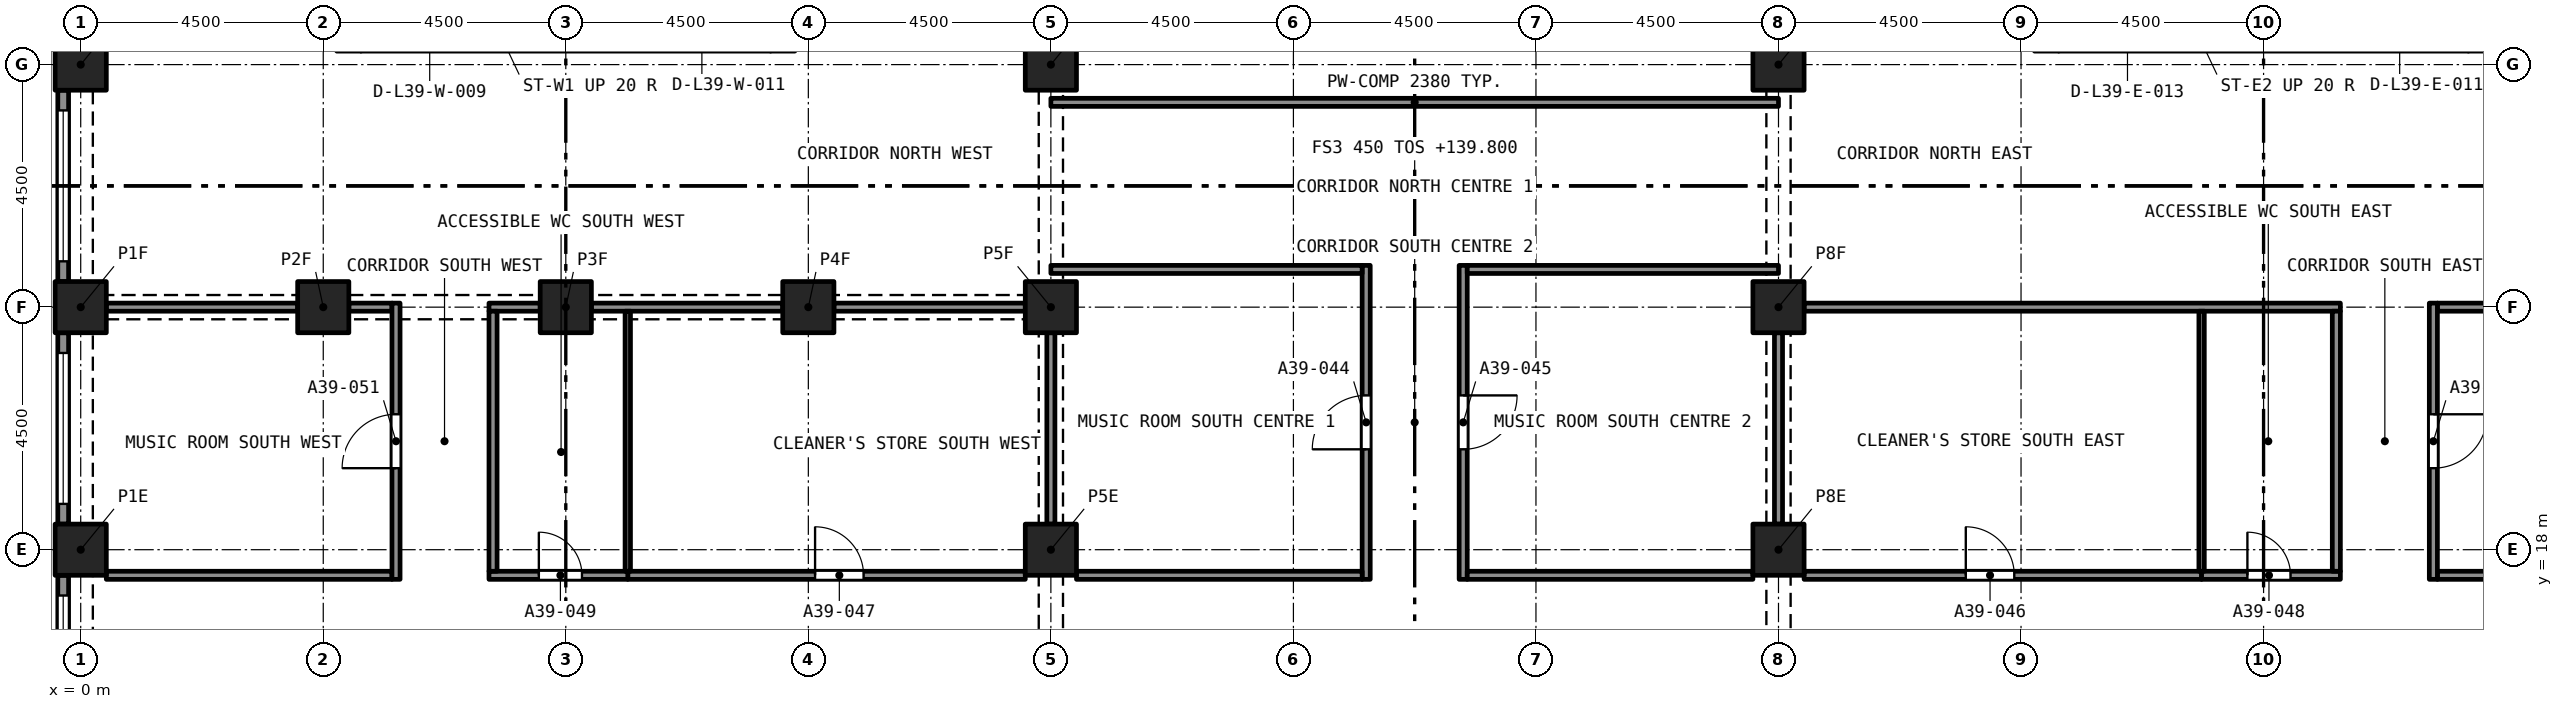
"""IFC4 building model, lengths in metres.
Left out: names, types, materials, properties, quantities, classifications, styles, units other than length and angle.
Written with IfcOpenShell. Run it as: python <this file> out.ifc"""

import sys

from ifc_helpers import new_model, si_unit, direction, frame, frame_2d, origin, origin_2d, place, context, subcontext, project, spatial, rectangle, extrude, element, fill, save


model = new_model("IFC4")
c1 = context("Model", 3, precision=1e-05, world=origin(), true_north=direction((0.0, 1.0)))
c2 = subcontext(c1, "Body", "Model", "MODEL_VIEW")
j1 = project(units=[si_unit("LENGTHUNIT", "METRE"), si_unit("PLANEANGLEUNIT", "RADIAN")], contexts=[c1])
p1 = place(None, origin())
s1 = spatial("IfcSite", under=j1, at=p1, CompositionType="ELEMENT")
p2 = place(p1, origin())
s2 = spatial("IfcBuilding", under=s1, at=p2, CompositionType="ELEMENT")
p3 = place(p2, frame((0.0, 0.0, 139.8)))
s3 = spatial("IfcBuildingStorey", under=s2, at=p3, CompositionType="ELEMENT", Elevation=139.8)
for number, where, z_axis, x_axis in (
    (1, (0.0, 18.0, 0.0), (0.0, 0.0, 1.0), (1.0, 0.0, 0.0)),
    (2, (18.0, 18.0, 0.0), (0.0, 0.0, 1.0), (1.0, 0.0, 0.0)),
    (3, (31.5, 18.0, 0.0), (0.0, 0.0, 1.0), (1.0, 0.0, 0.0)),
    (4, (0.0, 22.5, 0.0), (0.0, 0.0, 1.0), (1.0, 0.0, 0.0)),
    (5, (4.5, 22.5, 0.0), (0.0, 0.0, 1.0), (1.0, 0.0, 0.0)),
    (6, (9.0, 22.5, 0.0), (0.0, 0.0, 1.0), (1.0, 0.0, 0.0)),
    (7, (13.5, 22.5, 0.0), (0.0, 0.0, 1.0), (1.0, 0.0, 0.0)),
    (8, (18.0, 22.5, 0.0), (0.0, 0.0, 1.0), (1.0, 0.0, 0.0)),
    (9, (31.5, 22.5, 0.0), (0.0, 0.0, 1.0), (1.0, 0.0, 0.0)),
    (10, (0.0, 27.0, 0.0), (0.0, 0.0, 1.0), (1.0, 0.0, 0.0)),
    (11, (18.0, 27.0, 0.0), (0.0, 0.0, 1.0), (1.0, 0.0, 0.0)),
    (12, (31.5, 27.0, 0.0), (0.0, 0.0, 1.0), (1.0, 0.0, 0.0)),
):
    element("IfcColumn", number, at=place(p3, frame(where, z_axis=z_axis, x_axis=x_axis)), inside=s3, PredefinedType="COLUMN", context=c2, shape_type="SweptSolid", body=[
        extrude(rectangle(XDim=0.95, YDim=0.95, at=origin_2d()), origin(), (0.0, 0.0, 1.0), 3.2),
    ])
p4 = place(p3, frame((-0.325, 22.975, 0.0), z_axis=(0.0, 0.0, 1.0), x_axis=(0.0, 1.0, 0.0)))
e13 = element("IfcWall", 13, at=p4, inside=s3, PredefinedType="SOLIDWALL", context=c2, shape_type="SweptSolid", body=[
    extrude(rectangle(XDim=3.55, YDim=0.2, at=frame_2d((1.775, 0.0))), origin(), (0.0, 0.0, 1.0), 3.2),
])
p5 = place(p4, frame((0.375, 0.0, 0.45)))
e14 = element("IfcOpeningElement", 14, at=p5, cuts=e13, PredefinedType="OPENING", context=c2, shape_type="SweptSolid", body=[
    extrude(rectangle(XDim=2.8, YDim=1.95, at=frame_2d((1.4, 0.975))), frame((0.0, 0.11, 0.0), z_axis=(0.0, -1.0, 0.0), x_axis=(1.0, 0.0, 0.0)), (0.0, 0.0, 1.0), 0.22),
])
p6 = place(p3, frame((-0.325, 18.475, 0.0), z_axis=(0.0, 0.0, 1.0), x_axis=(0.0, 1.0, 0.0)))
e15 = element("IfcWall", 15, at=p6, inside=s3, PredefinedType="SOLIDWALL", context=c2, shape_type="SweptSolid", body=[
    extrude(rectangle(XDim=3.55, YDim=0.2, at=frame_2d((1.775, 0.0))), origin(), (0.0, 0.0, 1.0), 3.2),
])
p7 = place(p6, frame((0.375, 0.0, 0.45)))
e16 = element("IfcOpeningElement", 16, at=p7, cuts=e15, PredefinedType="OPENING", context=c2, shape_type="SweptSolid", body=[
    extrude(rectangle(XDim=2.8, YDim=1.95, at=frame_2d((1.4, 0.975))), frame((0.0, 0.11, 0.0), z_axis=(0.0, -1.0, 0.0), x_axis=(1.0, 0.0, 0.0)), (0.0, 0.0, 1.0), 0.22),
])
p8 = place(p3, frame((-0.325, 13.975, 0.0), z_axis=(0.0, 0.0, 1.0), x_axis=(0.0, 1.0, 0.0)))
e17 = element("IfcWall", 17, at=p8, inside=s3, PredefinedType="SOLIDWALL", context=c2, shape_type="SweptSolid", body=[
    extrude(rectangle(XDim=3.55, YDim=0.2, at=frame_2d((1.775, 0.0))), origin(), (0.0, 0.0, 1.0), 3.2),
])
p9 = place(p8, frame((0.375, 0.0, 0.45)))
e18 = element("IfcOpeningElement", 18, at=p9, cuts=e17, PredefinedType="OPENING", context=c2, shape_type="SweptSolid", body=[
    extrude(rectangle(XDim=2.8, YDim=1.95, at=frame_2d((1.4, 0.975))), frame((0.0, 0.11, 0.0), z_axis=(0.0, -1.0, 0.0), x_axis=(1.0, 0.0, 0.0)), (0.0, 0.0, 1.0), 0.22),
])
p10 = place(p3, frame((23.85, 17.45, 0.0), z_axis=(0.0, 0.0, 1.0), x_axis=(0.0, 1.0, 0.0)))
e19 = element("IfcWall", 19, at=p10, inside=s3, PredefinedType="PARTITIONING", context=c2, shape_type="SweptSolid", body=[
    extrude(rectangle(XDim=5.825, YDim=0.15, at=frame_2d((2.913, 0.0))), origin(), (0.0, 0.0, 1.0), 2.75),
])
p11 = place(p10, frame((2.413, 0.0, 0.0)))
e20 = element("IfcOpeningElement", 20, at=p11, cuts=e19, PredefinedType="OPENING", context=c2, shape_type="SweptSolid", body=[
    extrude(rectangle(XDim=1.0, YDim=2.1, at=frame_2d((0.5, 1.05))), frame((0.0, 0.085, 0.0), z_axis=(0.0, -1.0, 0.0), x_axis=(1.0, 0.0, 0.0)), (0.0, 0.0, 1.0), 0.17),
])
p12 = place(p3, frame((25.65, 23.275, 0.0), z_axis=(0.0, 0.0, 1.0), x_axis=(0.0, -1.0, 0.0)))
e21 = element("IfcWall", 21, at=p12, inside=s3, PredefinedType="PARTITIONING", context=c2, shape_type="SweptSolid", body=[
    extrude(rectangle(XDim=5.825, YDim=0.15, at=frame_2d((2.913, 0.0))), origin(), (0.0, 0.0, 1.0), 2.75),
])
p13 = place(p12, frame((2.413, 0.0, 0.0)))
e22 = element("IfcOpeningElement", 22, at=p13, cuts=e21, PredefinedType="OPENING", context=c2, shape_type="SweptSolid", body=[
    extrude(rectangle(XDim=1.0, YDim=2.1, at=frame_2d((0.5, 1.05))), frame((0.0, 0.085, 0.0), z_axis=(0.0, -1.0, 0.0), x_axis=(1.0, 0.0, 0.0)), (0.0, 0.0, 1.0), 0.17),
])
for number, where, z_axis, x_axis in (
    (23, (18.475, 17.525, 0.0), (0.0, 0.0, 1.0), (1.0, 0.0, 0.0)),
    (24, (25.725, 17.525, 0.0), (0.0, 0.0, 1.0), (1.0, 0.0, 0.0)),
):
    element("IfcWall", number, at=place(p3, frame(where, z_axis=z_axis, x_axis=x_axis)), inside=s3, PredefinedType="PARTITIONING", context=c2, shape_type="SweptSolid", body=[
        extrude(rectangle(XDim=5.3, YDim=0.15, at=frame_2d((2.65, 0.0))), origin(), (0.0, 0.0, 1.0), 2.75),
    ])
p14 = place(p3, frame((31.975, 17.525, 0.0), z_axis=(0.0, 0.0, 1.0), x_axis=(1.0, 0.0, 0.0)))
e25 = element("IfcWall", 25, at=p14, inside=s3, PredefinedType="PARTITIONING", context=c2, shape_type="SweptSolid", body=[
    extrude(rectangle(XDim=7.375, YDim=0.15, at=frame_2d((3.688, 0.0))), origin(), (0.0, 0.0, 1.0), 2.9),
])
p15 = place(p14, frame((3.0, 0.0, 0.0)))
e26 = element("IfcOpeningElement", 26, at=p15, cuts=e25, PredefinedType="OPENING", context=c2, shape_type="SweptSolid", body=[
    extrude(rectangle(XDim=0.9, YDim=2.1, at=frame_2d((0.45, 1.05))), frame((0.0, 0.085, 0.0), z_axis=(0.0, -1.0, 0.0), x_axis=(1.0, 0.0, 0.0)), (0.0, 0.0, 1.0), 0.17),
])
p16 = place(p3, frame((10.15, 17.525, 0.0), z_axis=(0.0, 0.0, 1.0), x_axis=(1.0, 0.0, 0.0)))
e27 = element("IfcWall", 27, at=p16, inside=s3, PredefinedType="PARTITIONING", context=c2, shape_type="SweptSolid", body=[
    extrude(rectangle(XDim=7.375, YDim=0.15, at=frame_2d((3.688, 0.0))), origin(), (0.0, 0.0, 1.0), 2.9),
])
p17 = place(p16, frame((3.475, 0.0, 0.0)))
e28 = element("IfcOpeningElement", 28, at=p17, cuts=e27, PredefinedType="OPENING", context=c2, shape_type="SweptSolid", body=[
    extrude(rectangle(XDim=0.9, YDim=2.1, at=frame_2d((0.45, 1.05))), frame((0.0, 0.085, 0.0), z_axis=(0.0, -1.0, 0.0), x_axis=(1.0, 0.0, 0.0)), (0.0, 0.0, 1.0), 0.17),
])
p18 = place(p3, frame((39.35, 17.525, 0.0), z_axis=(0.0, 0.0, 1.0), x_axis=(1.0, 0.0, 0.0)))
e29 = element("IfcWall", 29, at=p18, inside=s3, PredefinedType="PARTITIONING", context=c2, shape_type="SweptSolid", body=[
    extrude(rectangle(XDim=2.575, YDim=0.15, at=frame_2d((1.288, 0.0))), origin(), (0.0, 0.0, 1.0), 2.9),
])
p19 = place(p18, frame((0.85, 0.0, 0.0)))
e30 = element("IfcOpeningElement", 30, at=p19, cuts=e29, PredefinedType="OPENING", context=c2, shape_type="SweptSolid", body=[
    extrude(rectangle(XDim=0.8, YDim=2.1, at=frame_2d((0.4, 1.05))), frame((0.0, 0.085, 0.0), z_axis=(0.0, -1.0, 0.0), x_axis=(1.0, 0.0, 0.0)), (0.0, 0.0, 1.0), 0.17),
])
p20 = place(p3, frame((7.575, 17.525, 0.0), z_axis=(0.0, 0.0, 1.0), x_axis=(1.0, 0.0, 0.0)))
e31 = element("IfcWall", 31, at=p20, inside=s3, PredefinedType="PARTITIONING", context=c2, shape_type="SweptSolid", body=[
    extrude(rectangle(XDim=2.575, YDim=0.15, at=frame_2d((1.288, 0.0))), origin(), (0.0, 0.0, 1.0), 2.9),
])
p21 = place(p20, frame((0.925, 0.0, 0.0)))
e32 = element("IfcOpeningElement", 32, at=p21, cuts=e31, PredefinedType="OPENING", context=c2, shape_type="SweptSolid", body=[
    extrude(rectangle(XDim=0.8, YDim=2.1, at=frame_2d((0.4, 1.05))), frame((0.0, 0.085, 0.0), z_axis=(0.0, -1.0, 0.0), x_axis=(1.0, 0.0, 0.0)), (0.0, 0.0, 1.0), 0.17),
])
for number, where, z_axis, x_axis in (
    (33, (43.725, 17.525, 0.0), (0.0, 0.0, 1.0), (1.0, 0.0, 0.0)),
    (34, (0.475, 17.525, 0.0), (0.0, 0.0, 1.0), (1.0, 0.0, 0.0)),
):
    element("IfcWall", number, at=place(p3, frame(where, z_axis=z_axis, x_axis=x_axis)), inside=s3, PredefinedType="PARTITIONING", context=c2, shape_type="SweptSolid", body=[
        extrude(rectangle(XDim=5.3, YDim=0.15, at=frame_2d((2.65, 0.0))), origin(), (0.0, 0.0, 1.0), 2.9),
    ])
p22 = place(p3, frame((18.0, 26.3, 0.0), z_axis=(0.0, 0.0, 1.0), x_axis=(1.0, 0.0, 0.0)))
e35 = element("IfcWall", 35, at=p22, inside=s3, PredefinedType="PARTITIONING", context=c2, shape_type="SweptSolid", body=[
    extrude(rectangle(XDim=13.5, YDim=0.15, at=frame_2d((6.75, 0.0))), origin(), (0.0, 0.0, 1.0), 2.38),
])
p23 = place(p3, frame((18.0, 23.2, 0.0), z_axis=(0.0, 0.0, 1.0), x_axis=(1.0, 0.0, 0.0)))
e36 = element("IfcWall", 36, at=p23, inside=s3, PredefinedType="PARTITIONING", context=c2, shape_type="SweptSolid", body=[
    extrude(rectangle(XDim=5.775, YDim=0.15, at=frame_2d((2.887, 0.0))), origin(), (0.0, 0.0, 1.0), 2.75),
])
p24 = place(p3, frame((18.0, 18.475, 0.0), z_axis=(0.0, 0.0, 1.0), x_axis=(0.0, 1.0, 0.0)))
e37 = element("IfcWall", 37, at=p24, inside=s3, PredefinedType="PARTITIONING", context=c2, shape_type="SweptSolid", body=[
    extrude(rectangle(XDim=3.55, YDim=0.15, at=frame_2d((1.775, 0.0))), origin(), (0.0, 0.0, 1.0), 2.38),
])
p25 = place(p3, frame((25.725, 23.2, 0.0), z_axis=(0.0, 0.0, 1.0), x_axis=(1.0, 0.0, 0.0)))
e38 = element("IfcWall", 38, at=p25, inside=s3, PredefinedType="PARTITIONING", context=c2, shape_type="SweptSolid", body=[
    extrude(rectangle(XDim=5.775, YDim=0.15, at=frame_2d((2.887, 0.0))), origin(), (0.0, 0.0, 1.0), 2.75),
])
p26 = place(p3, frame((31.5, 18.475, 0.0), z_axis=(0.0, 0.0, 1.0), x_axis=(0.0, 1.0, 0.0)))
e39 = element("IfcWall", 39, at=p26, inside=s3, PredefinedType="PARTITIONING", context=c2, shape_type="SweptSolid", body=[
    extrude(rectangle(XDim=3.55, YDim=0.15, at=frame_2d((1.775, 0.0))), origin(), (0.0, 0.0, 1.0), 2.38),
])
p27 = place(p3, frame((31.975, 22.5, 0.0), z_axis=(0.0, 0.0, 1.0), x_axis=(1.0, 0.0, 0.0)))
e40 = element("IfcWall", 40, at=p27, inside=s3, PredefinedType="PARTITIONING", context=c2, shape_type="SweptSolid", body=[
    extrude(rectangle(XDim=9.95, YDim=0.15, at=frame_2d((4.975, 0.0))), origin(), (0.0, 0.0, 1.0), 2.9),
])
p28 = place(p3, frame((43.725, 22.5, 0.0), z_axis=(0.0, 0.0, 1.0), x_axis=(1.0, 0.0, 0.0)))
e41 = element("IfcWall", 41, at=p28, inside=s3, PredefinedType="PARTITIONING", context=c2, shape_type="SweptSolid", body=[
    extrude(rectangle(XDim=5.3, YDim=0.15, at=frame_2d((2.65, 0.0))), origin(), (0.0, 0.0, 1.0), 2.9),
])
for number, where, z_axis, x_axis in (
    (42, (13.975, 22.5, 0.0), (0.0, 0.0, 1.0), (1.0, 0.0, 0.0)),
    (43, (9.475, 22.5, 0.0), (0.0, 0.0, 1.0), (1.0, 0.0, 0.0)),
):
    element("IfcWall", number, at=place(p3, frame(where, z_axis=z_axis, x_axis=x_axis)), inside=s3, PredefinedType="PARTITIONING", context=c2, shape_type="SweptSolid", body=[
        extrude(rectangle(XDim=3.55, YDim=0.15, at=frame_2d((1.775, 0.0))), origin(), (0.0, 0.0, 1.0), 2.38),
    ])
p29 = place(p3, frame((7.575, 22.5, 0.0), z_axis=(0.0, 0.0, 1.0), x_axis=(1.0, 0.0, 0.0)))
e44 = element("IfcWall", 44, at=p29, inside=s3, PredefinedType="PARTITIONING", context=c2, shape_type="SweptSolid", body=[
    extrude(rectangle(XDim=0.95, YDim=0.15, at=frame_2d((0.475, 0.0))), origin(), (0.0, 0.0, 1.0), 2.38),
])
p30 = place(p3, frame((4.975, 22.5, 0.0), z_axis=(0.0, 0.0, 1.0), x_axis=(1.0, 0.0, 0.0)))
e45 = element("IfcWall", 45, at=p30, inside=s3, PredefinedType="PARTITIONING", context=c2, shape_type="SweptSolid", body=[
    extrude(rectangle(XDim=0.8, YDim=0.15, at=frame_2d((0.4, 0.0))), origin(), (0.0, 0.0, 1.0), 2.38),
])
p31 = place(p3, frame((0.475, 22.5, 0.0), z_axis=(0.0, 0.0, 1.0), x_axis=(1.0, 0.0, 0.0)))
e46 = element("IfcWall", 46, at=p31, inside=s3, PredefinedType="PARTITIONING", context=c2, shape_type="SweptSolid", body=[
    extrude(rectangle(XDim=3.55, YDim=0.15, at=frame_2d((1.775, 0.0))), origin(), (0.0, 0.0, 1.0), 2.38),
])
p32 = place(p3, frame((41.85, 17.6, 0.0), z_axis=(0.0, 0.0, 1.0), x_axis=(0.0, 1.0, 0.0)))
e47 = element("IfcWall", 47, at=p32, inside=s3, PredefinedType="PARTITIONING", context=c2, shape_type="SweptSolid", body=[
    extrude(rectangle(XDim=4.825, YDim=0.15, at=frame_2d((2.413, 0.0))), origin(), (0.0, 0.0, 1.0), 2.9),
])
p33 = place(p3, frame((43.65, 22.575, 0.0), z_axis=(0.0, 0.0, 1.0), x_axis=(0.0, -1.0, 0.0)))
e48 = element("IfcWall", 48, at=p33, inside=s3, PredefinedType="PARTITIONING", context=c2, shape_type="SweptSolid", body=[
    extrude(rectangle(XDim=5.125, YDim=0.15, at=frame_2d((2.562, 0.0))), origin(), (0.0, 0.0, 1.0), 2.9),
])
p34 = place(p33, frame((2.062, 0.0, 0.0)))
e49 = element("IfcOpeningElement", 49, at=p34, cuts=e48, PredefinedType="OPENING", context=c2, shape_type="SweptSolid", body=[
    extrude(rectangle(XDim=1.0, YDim=2.1, at=frame_2d((0.5, 1.05))), frame((0.0, 0.085, 0.0), z_axis=(0.0, -1.0, 0.0), x_axis=(1.0, 0.0, 0.0)), (0.0, 0.0, 1.0), 0.17),
])
p35 = place(p3, frame((7.65, 17.6, 0.0), z_axis=(0.0, 0.0, 1.0), x_axis=(0.0, 1.0, 0.0)))
e50 = element("IfcWall", 50, at=p35, inside=s3, PredefinedType="PARTITIONING", context=c2, shape_type="SweptSolid", body=[
    extrude(rectangle(XDim=4.825, YDim=0.15, at=frame_2d((2.413, 0.0))), origin(), (0.0, 0.0, 1.0), 2.9),
])
p36 = place(p3, frame((5.85, 17.45, 0.0), z_axis=(0.0, 0.0, 1.0), x_axis=(0.0, 1.0, 0.0)))
e51 = element("IfcWall", 51, at=p36, inside=s3, PredefinedType="PARTITIONING", context=c2, shape_type="SweptSolid", body=[
    extrude(rectangle(XDim=5.125, YDim=0.15, at=frame_2d((2.562, 0.0))), origin(), (0.0, 0.0, 1.0), 2.9),
])
p37 = place(p36, frame((2.062, 0.0, 0.0)))
e52 = element("IfcOpeningElement", 52, at=p37, cuts=e51, PredefinedType="OPENING", context=c2, shape_type="SweptSolid", body=[
    extrude(rectangle(XDim=1.0, YDim=2.1, at=frame_2d((0.5, 1.05))), frame((0.0, 0.085, 0.0), z_axis=(0.0, -1.0, 0.0), x_axis=(1.0, 0.0, 0.0)), (0.0, 0.0, 1.0), 0.17),
])
for number, where, z_axis, x_axis in (
    (53, (39.35, 17.6, 0.0), (0.0, 0.0, 1.0), (0.0, 1.0, 0.0)),
    (54, (10.15, 17.6, 0.0), (0.0, 0.0, 1.0), (0.0, 1.0, 0.0)),
):
    element("IfcWall", number, at=place(p3, frame(where, z_axis=z_axis, x_axis=x_axis)), inside=s3, PredefinedType="PARTITIONING", context=c2, shape_type="SweptSolid", body=[
        extrude(rectangle(XDim=4.825, YDim=0.1, at=frame_2d((2.413, 0.0))), origin(), (0.0, 0.0, 1.0), 2.9),
    ])
p38 = place(p5, origin())
e55 = element("IfcWindow", 55, at=p38, inside=s3, PartitioningType="SINGLE_PANEL", PredefinedType="WINDOW", context=c2, shape_type="SweptSolid", body=[
    extrude(rectangle(XDim=2.8, YDim=1.95, at=frame_2d((1.4, 0.975))), frame((0.0, 0.03, 0.0), z_axis=(0.0, -1.0, 0.0), x_axis=(1.0, 0.0, 0.0)), (0.0, 0.0, 1.0), 0.06),
])
fill(e14, e55)
p39 = place(p7, origin())
e56 = element("IfcWindow", 56, at=p39, inside=s3, PartitioningType="SINGLE_PANEL", PredefinedType="WINDOW", context=c2, shape_type="SweptSolid", body=[
    extrude(rectangle(XDim=2.8, YDim=1.95, at=frame_2d((1.4, 0.975))), frame((0.0, 0.03, 0.0), z_axis=(0.0, -1.0, 0.0), x_axis=(1.0, 0.0, 0.0)), (0.0, 0.0, 1.0), 0.06),
])
fill(e16, e56)
p40 = place(p9, origin())
e57 = element("IfcWindow", 57, at=p40, inside=s3, PartitioningType="SINGLE_PANEL", PredefinedType="WINDOW", context=c2, shape_type="SweptSolid", body=[
    extrude(rectangle(XDim=2.8, YDim=1.95, at=frame_2d((1.4, 0.975))), frame((0.0, 0.03, 0.0), z_axis=(0.0, -1.0, 0.0), x_axis=(1.0, 0.0, 0.0)), (0.0, 0.0, 1.0), 0.06),
])
fill(e18, e57)
p41 = place(p11, origin())
e58 = element("IfcDoor", 58, at=p41, inside=s3, OperationType="SINGLE_SWING_LEFT", PredefinedType="DOOR", context=c2, shape_type="SweptSolid", body=[
    extrude(rectangle(XDim=1.0, YDim=2.1, at=frame_2d((0.5, 1.05))), frame((0.0, 0.025, 0.0), z_axis=(0.0, -1.0, 0.0), x_axis=(1.0, 0.0, 0.0)), (0.0, 0.0, 1.0), 0.05),
])
fill(e20, e58)
p42 = place(p13, origin())
e59 = element("IfcDoor", 59, at=p42, inside=s3, OperationType="SINGLE_SWING_RIGHT", PredefinedType="DOOR", context=c2, shape_type="SweptSolid", body=[
    extrude(rectangle(XDim=1.0, YDim=2.1, at=frame_2d((0.5, 1.05))), frame((0.0, 0.025, 0.0), z_axis=(0.0, -1.0, 0.0), x_axis=(1.0, 0.0, 0.0)), (0.0, 0.0, 1.0), 0.05),
])
fill(e22, e59)
p43 = place(p15, origin())
e60 = element("IfcDoor", 60, at=p43, inside=s3, OperationType="SINGLE_SWING_LEFT", PredefinedType="DOOR", context=c2, shape_type="SweptSolid", body=[
    extrude(rectangle(XDim=0.9, YDim=2.1, at=frame_2d((0.45, 1.05))), frame((0.0, 0.025, 0.0), z_axis=(0.0, -1.0, 0.0), x_axis=(1.0, 0.0, 0.0)), (0.0, 0.0, 1.0), 0.05),
])
fill(e26, e60)
p44 = place(p17, origin())
e61 = element("IfcDoor", 61, at=p44, inside=s3, OperationType="SINGLE_SWING_RIGHT", PredefinedType="DOOR", context=c2, shape_type="SweptSolid", body=[
    extrude(rectangle(XDim=0.9, YDim=2.1, at=frame_2d((0.45, 1.05))), frame((0.0, 0.025, 0.0), z_axis=(0.0, -1.0, 0.0), x_axis=(1.0, 0.0, 0.0)), (0.0, 0.0, 1.0), 0.05),
])
fill(e28, e61)
p45 = place(p19, origin())
e62 = element("IfcDoor", 62, at=p45, inside=s3, OperationType="SINGLE_SWING_LEFT", PredefinedType="DOOR", context=c2, shape_type="SweptSolid", body=[
    extrude(rectangle(XDim=0.8, YDim=2.1, at=frame_2d((0.4, 1.05))), frame((0.0, 0.025, 0.0), z_axis=(0.0, -1.0, 0.0), x_axis=(1.0, 0.0, 0.0)), (0.0, 0.0, 1.0), 0.05),
])
fill(e30, e62)
p46 = place(p21, origin())
e63 = element("IfcDoor", 63, at=p46, inside=s3, OperationType="SINGLE_SWING_RIGHT", PredefinedType="DOOR", context=c2, shape_type="SweptSolid", body=[
    extrude(rectangle(XDim=0.8, YDim=2.1, at=frame_2d((0.4, 1.05))), frame((0.0, 0.025, 0.0), z_axis=(0.0, -1.0, 0.0), x_axis=(1.0, 0.0, 0.0)), (0.0, 0.0, 1.0), 0.05),
])
fill(e32, e63)
p47 = place(p34, origin())
e64 = element("IfcDoor", 64, at=p47, inside=s3, OperationType="SINGLE_SWING_RIGHT", PredefinedType="DOOR", context=c2, shape_type="SweptSolid", body=[
    extrude(rectangle(XDim=1.0, YDim=2.1, at=frame_2d((0.5, 1.05))), frame((0.0, 0.025, 0.0), z_axis=(0.0, -1.0, 0.0), x_axis=(1.0, 0.0, 0.0)), (0.0, 0.0, 1.0), 0.05),
])
fill(e49, e64)
p48 = place(p37, origin())
e65 = element("IfcDoor", 65, at=p48, inside=s3, OperationType="SINGLE_SWING_RIGHT", PredefinedType="DOOR", context=c2, shape_type="SweptSolid", body=[
    extrude(rectangle(XDim=1.0, YDim=2.1, at=frame_2d((0.5, 1.05))), frame((0.0, 0.025, 0.0), z_axis=(0.0, -1.0, 0.0), x_axis=(1.0, 0.0, 0.0)), (0.0, 0.0, 1.0), 0.05),
])
fill(e52, e65)
save(model, sys.argv[1])
